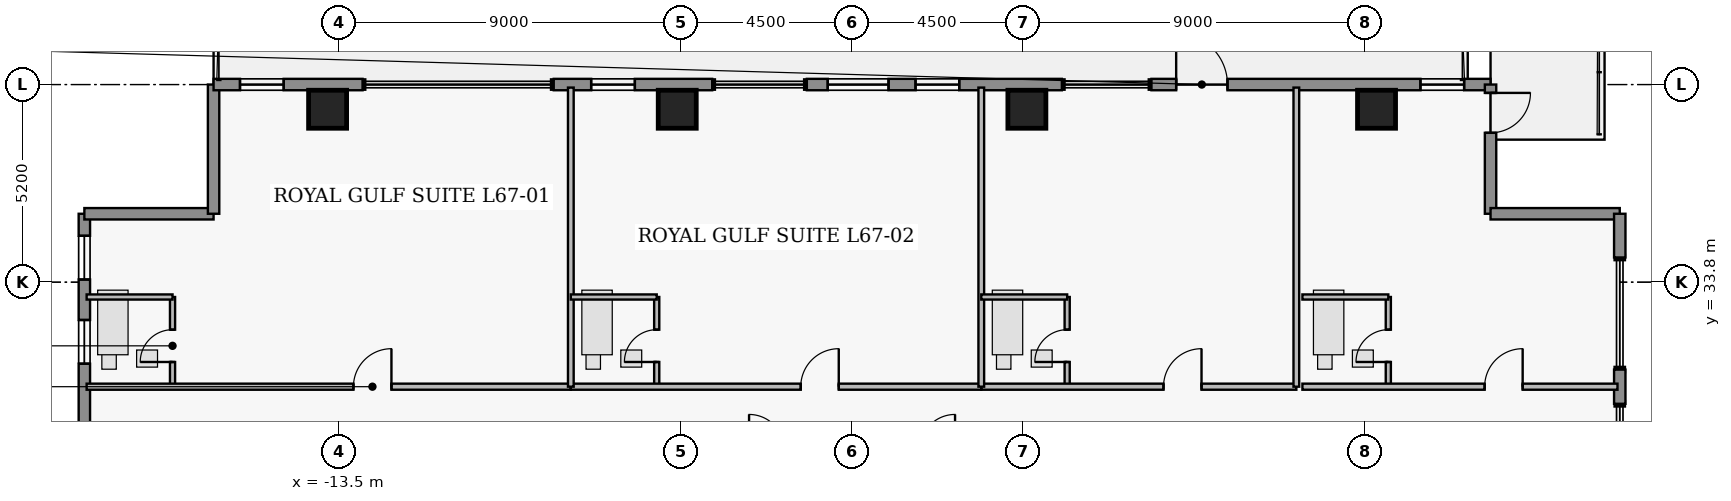
"""IFC4 building model, lengths in metres.
Left out: names, types, materials, properties, quantities, classifications, styles, units other than length and angle.
Written with IfcOpenShell. Run it as: python <this file> out.ifc"""

import sys

from ifc_helpers import new_model, si_unit, direction, frame, frame_2d, origin, origin_2d, place, context, subcontext, project, spatial, rectangle, extrude, element, fill, save


model = new_model("IFC4")
c1 = context("Model", 3, precision=1e-05, world=origin(), true_north=direction((0.0, 1.0)))
c2 = subcontext(c1, "Body", "Model", "MODEL_VIEW")
j1 = project(units=[si_unit("LENGTHUNIT", "METRE"), si_unit("PLANEANGLEUNIT", "RADIAN")], contexts=[c1])
p1 = place(None, origin())
s1 = spatial("IfcSite", under=j1, at=p1, CompositionType="ELEMENT")
p2 = place(p1, origin())
s2 = spatial("IfcBuilding", under=s1, at=p2, CompositionType="ELEMENT")
p3 = place(p2, frame((0.0, 0.0, 265.55)))
s3 = spatial("IfcBuildingStorey", under=s2, at=p3, CompositionType="ELEMENT", Elevation=265.55)
for number, where, z_axis, x_axis in (
    (1, (-13.8, 38.35, 0.0), (0.0, 0.0, 1.0), (1.0, 0.0, 0.0)),
    (2, (-4.6, 38.35, 0.0), (0.0, 0.0, 1.0), (1.0, 0.0, 0.0)),
    (3, (4.6, 38.35, 0.0), (0.0, 0.0, 1.0), (1.0, 0.0, 0.0)),
    (4, (13.8, 38.35, 0.0), (0.0, 0.0, 1.0), (1.0, 0.0, 0.0)),
):
    element("IfcColumn", number, at=place(p3, frame(where, z_axis=z_axis, x_axis=x_axis)), inside=s3, PredefinedType="COLUMN", context=c2, shape_type="SweptSolid", body=[
        extrude(rectangle(XDim=1.0, YDim=1.0, at=origin_2d()), origin(), (0.0, 0.0, 1.0), 3.7),
    ])
p4 = place(p3, frame((-20.2, 28.93, 0.0), z_axis=(0.0, 0.0, 1.0), x_axis=(0.0, 1.0, 0.0)))
e5 = element("IfcWall", 5, at=p4, inside=s3, PredefinedType="STANDARD", context=c2, shape_type="SweptSolid", body=[
    extrude(rectangle(XDim=6.67, YDim=0.3, at=frame_2d((3.335, 0.0))), origin(), (0.0, 0.0, 1.0), 3.48),
])
p5 = place(p4, frame((2.725, 0.0, 0.95)))
e6 = element("IfcOpeningElement", 6, at=p5, cuts=e5, PredefinedType="OPENING", context=c2, shape_type="SweptSolid", body=[
    extrude(rectangle(XDim=1.15, YDim=1.55, at=frame_2d((0.575, 0.775))), frame((0.0, 0.16, 0.0), z_axis=(0.0, -1.0, 0.0), x_axis=(1.0, 0.0, 0.0)), (0.0, 0.0, 1.0), 0.32),
])
p6 = place(p4, frame((4.94, 0.0, 0.95)))
e7 = element("IfcOpeningElement", 7, at=p6, cuts=e5, PredefinedType="OPENING", context=c2, shape_type="SweptSolid", body=[
    extrude(rectangle(XDim=1.15, YDim=1.55, at=frame_2d((0.575, 0.775))), frame((0.0, 0.16, 0.0), z_axis=(0.0, -1.0, 0.0), x_axis=(1.0, 0.0, 0.0)), (0.0, 0.0, 1.0), 0.32),
])
for number, where, z_axis, x_axis in (
    (8, (-20.2, 35.6, 0.0), (0.0, 0.0, 1.0), (1.0, 0.0, 0.0)),
    (9, (-16.8, 35.6, 0.0), (0.0, 0.0, 1.0), (0.0, 1.0, 0.0)),
):
    element("IfcWall", number, at=place(p3, frame(where, z_axis=z_axis, x_axis=x_axis)), inside=s3, PredefinedType="STANDARD", context=c2, shape_type="SweptSolid", body=[
        extrude(rectangle(XDim=3.4, YDim=0.3, at=frame_2d((1.7, 0.0))), origin(), (0.0, 0.0, 1.0), 3.48),
    ])
p7 = place(p3, frame((-16.8, 39.0, 0.0), z_axis=(0.0, 0.0, 1.0), x_axis=(1.0, 0.0, 0.0)))
e10 = element("IfcWall", 10, at=p7, inside=s3, PredefinedType="STANDARD", context=c2, shape_type="SweptSolid", body=[
    extrude(rectangle(XDim=3.92, YDim=0.3, at=frame_2d((1.96, 0.0))), origin(), (0.0, 0.0, 1.0), 3.48),
])
p8 = place(p7, frame((0.695, 0.0, 0.95)))
e11 = element("IfcOpeningElement", 11, at=p8, cuts=e10, PredefinedType="OPENING", context=c2, shape_type="SweptSolid", body=[
    extrude(rectangle(XDim=1.15, YDim=1.55, at=frame_2d((0.575, 0.775))), frame((0.0, 0.16, 0.0), z_axis=(0.0, -1.0, 0.0), x_axis=(1.0, 0.0, 0.0)), (0.0, 0.0, 1.0), 0.32),
])
p9 = place(p3, frame((-7.85, 39.0, 0.0), z_axis=(0.0, 0.0, 1.0), x_axis=(1.0, 0.0, 0.0)))
e12 = element("IfcWall", 12, at=p9, inside=s3, PredefinedType="STANDARD", context=c2, shape_type="SweptSolid", body=[
    extrude(rectangle(XDim=4.17, YDim=0.3, at=frame_2d((2.085, 0.0))), origin(), (0.0, 0.0, 1.0), 3.48),
])
p10 = place(p9, frame((0.985, 0.0, 0.95)))
e13 = element("IfcOpeningElement", 13, at=p10, cuts=e12, PredefinedType="OPENING", context=c2, shape_type="SweptSolid", body=[
    extrude(rectangle(XDim=1.15, YDim=1.55, at=frame_2d((0.575, 0.775))), frame((0.0, 0.16, 0.0), z_axis=(0.0, -1.0, 0.0), x_axis=(1.0, 0.0, 0.0)), (0.0, 0.0, 1.0), 0.32),
])
p11 = place(p3, frame((-1.19, 39.0, 0.0), z_axis=(0.0, 0.0, 1.0), x_axis=(1.0, 0.0, 0.0)))
e14 = element("IfcWall", 14, at=p11, inside=s3, PredefinedType="STANDARD", context=c2, shape_type="SweptSolid", body=[
    extrude(rectangle(XDim=6.71, YDim=0.3, at=frame_2d((3.355, 0.0))), origin(), (0.0, 0.0, 1.0), 3.48),
])
p12 = place(p11, frame((0.55, 0.0, 0.85)))
e15 = element("IfcOpeningElement", 15, at=p12, cuts=e14, PredefinedType="OPENING", context=c2, shape_type="SweptSolid", body=[
    extrude(rectangle(XDim=1.6, YDim=1.8, at=frame_2d((0.8, 0.9))), frame((0.0, 0.16, 0.0), z_axis=(0.0, -1.0, 0.0), x_axis=(1.0, 0.0, 0.0)), (0.0, 0.0, 1.0), 0.32),
])
p13 = place(p11, frame((2.86, 0.0, 0.95)))
e16 = element("IfcOpeningElement", 16, at=p13, cuts=e14, PredefinedType="OPENING", context=c2, shape_type="SweptSolid", body=[
    extrude(rectangle(XDim=1.15, YDim=1.55, at=frame_2d((0.575, 0.775))), frame((0.0, 0.16, 0.0), z_axis=(0.0, -1.0, 0.0), x_axis=(1.0, 0.0, 0.0)), (0.0, 0.0, 1.0), 0.32),
])
p14 = place(p3, frame((7.878, 39.0, 0.0), z_axis=(0.0, 0.0, 1.0), x_axis=(1.0, 0.0, 0.0)))
e17 = element("IfcWall", 17, at=p14, inside=s3, PredefinedType="STANDARD", context=c2, shape_type="SweptSolid", body=[
    extrude(rectangle(XDim=8.922, YDim=0.3, at=frame_2d((4.461, 0.0))), origin(), (0.0, 0.0, 1.0), 3.48),
])
p15 = place(p14, frame((0.65, 0.0, 0.0)))
e18 = element("IfcOpeningElement", 18, at=p15, cuts=e17, PredefinedType="OPENING", context=c2, shape_type="SweptSolid", body=[
    extrude(rectangle(XDim=1.35, YDim=2.3, at=frame_2d((0.675, 1.15))), frame((0.0, 0.16, 0.0), z_axis=(0.0, -1.0, 0.0), x_axis=(1.0, 0.0, 0.0)), (0.0, 0.0, 1.0), 0.32),
])
p16 = place(p14, frame((7.077, 0.0, 0.95)))
e19 = element("IfcOpeningElement", 19, at=p16, cuts=e17, PredefinedType="OPENING", context=c2, shape_type="SweptSolid", body=[
    extrude(rectangle(XDim=1.15, YDim=1.55, at=frame_2d((0.575, 0.775))), frame((0.0, 0.16, 0.0), z_axis=(0.0, -1.0, 0.0), x_axis=(1.0, 0.0, 0.0)), (0.0, 0.0, 1.0), 0.32),
])
p17 = place(p3, frame((16.8, 39.0, 0.0), z_axis=(0.0, 0.0, 1.0), x_axis=(0.0, -1.0, 0.0)))
e20 = element("IfcWall", 20, at=p17, inside=s3, PredefinedType="STANDARD", context=c2, shape_type="SweptSolid", body=[
    extrude(rectangle(XDim=3.4, YDim=0.3, at=frame_2d((1.7, 0.0))), origin(), (0.0, 0.0, 1.0), 3.48),
])
p18 = place(p17, frame((0.22, 0.0, 0.0)))
e21 = element("IfcOpeningElement", 21, at=p18, cuts=e20, PredefinedType="OPENING", context=c2, shape_type="SweptSolid", body=[
    extrude(rectangle(XDim=1.05, YDim=2.2, at=frame_2d((0.525, 1.1))), frame((0.0, 0.16, 0.0), z_axis=(0.0, -1.0, 0.0), x_axis=(1.0, 0.0, 0.0)), (0.0, 0.0, 1.0), 0.32),
])
p19 = place(p3, frame((16.8, 35.6, 0.0), z_axis=(0.0, 0.0, 1.0), x_axis=(1.0, 0.0, 0.0)))
e22 = element("IfcWall", 22, at=p19, inside=s3, PredefinedType="STANDARD", context=c2, shape_type="SweptSolid", body=[
    extrude(rectangle(XDim=3.4, YDim=0.3, at=frame_2d((1.7, 0.0))), origin(), (0.0, 0.0, 1.0), 3.48),
])
p20 = place(p3, frame((20.2, 35.6, 0.0), z_axis=(0.0, 0.0, 1.0), x_axis=(0.0, -1.0, 0.0)))
e23 = element("IfcWall", 23, at=p20, inside=s3, PredefinedType="STANDARD", context=c2, shape_type="SweptSolid", body=[
    extrude(rectangle(XDim=1.15, YDim=0.3, at=frame_2d((0.575, 0.0))), origin(), (0.0, 0.0, 1.0), 3.48),
])
p21 = place(p3, frame((20.2, 31.5, 0.0), z_axis=(0.0, 0.0, 1.0), x_axis=(0.0, -1.0, 0.0)))
e24 = element("IfcWall", 24, at=p21, inside=s3, PredefinedType="STANDARD", context=c2, shape_type="SweptSolid", body=[
    extrude(rectangle(XDim=0.9, YDim=0.3, at=frame_2d((0.45, 0.0))), origin(), (0.0, 0.0, 1.0), 3.48),
])
p22 = place(p3, frame((-17.88, 31.05, 0.0), z_axis=(0.0, 0.0, 1.0), x_axis=(0.0, 1.0, 0.0)))
e25 = element("IfcWall", 25, at=p22, inside=s3, PredefinedType="PLUMBINGWALL", context=c2, shape_type="SweptSolid", body=[
    extrude(rectangle(XDim=2.36, YDim=0.135, at=frame_2d((1.18, 0.0))), origin(), (0.0, 0.0, 1.0), 3.48),
])
p23 = place(p22, frame((0.65, 0.0, 0.0)))
e26 = element("IfcOpeningElement", 26, at=p23, cuts=e25, PredefinedType="OPENING", context=c2, shape_type="SweptSolid", body=[
    extrude(rectangle(XDim=0.85, YDim=2.1, at=frame_2d((0.425, 1.05))), frame((0.0, 0.077, 0.0), z_axis=(0.0, -1.0, 0.0), x_axis=(1.0, 0.0, 0.0)), (0.0, 0.0, 1.0), 0.155),
])
p24 = place(p3, frame((-20.14, 31.05, 0.0), z_axis=(0.0, 0.0, 1.0), x_axis=(1.0, 0.0, 0.0)))
e27 = element("IfcWall", 27, at=p24, inside=s3, PredefinedType="PARTITIONING", context=c2, shape_type="SweptSolid", body=[
    extrude(rectangle(XDim=12.74, YDim=0.16, at=frame_2d((6.37, 0.0))), origin(), (0.0, 0.0, 1.0), 3.48),
])
p25 = place(p24, frame((7.02, 0.0, 0.0)))
e28 = element("IfcOpeningElement", 28, at=p25, cuts=e27, PredefinedType="OPENING", context=c2, shape_type="SweptSolid", body=[
    extrude(rectangle(XDim=1.0, YDim=2.15, at=frame_2d((0.5, 1.075))), frame((0.0, 0.09, 0.0), z_axis=(0.0, -1.0, 0.0), x_axis=(1.0, 0.0, 0.0)), (0.0, 0.0, 1.0), 0.18),
])
p26 = place(p3, frame((-5.14, 31.05, 0.0), z_axis=(0.0, 0.0, 1.0), x_axis=(0.0, 1.0, 0.0)))
e29 = element("IfcWall", 29, at=p26, inside=s3, PredefinedType="PLUMBINGWALL", context=c2, shape_type="SweptSolid", body=[
    extrude(rectangle(XDim=2.36, YDim=0.135, at=frame_2d((1.18, 0.0))), origin(), (0.0, 0.0, 1.0), 3.48),
])
p27 = place(p26, frame((0.65, 0.0, 0.0)))
e30 = element("IfcOpeningElement", 30, at=p27, cuts=e29, PredefinedType="OPENING", context=c2, shape_type="SweptSolid", body=[
    extrude(rectangle(XDim=0.85, YDim=2.1, at=frame_2d((0.425, 1.05))), frame((0.0, 0.077, 0.0), z_axis=(0.0, -1.0, 0.0), x_axis=(1.0, 0.0, 0.0)), (0.0, 0.0, 1.0), 0.155),
])
p28 = place(p3, frame((-7.4, 31.05, 0.0), z_axis=(0.0, 0.0, 1.0), x_axis=(1.0, 0.0, 0.0)))
e31 = element("IfcWall", 31, at=p28, inside=s3, PredefinedType="PARTITIONING", context=c2, shape_type="SweptSolid", body=[
    extrude(rectangle(XDim=10.8, YDim=0.16, at=frame_2d((5.4, 0.0))), origin(), (0.0, 0.0, 1.0), 3.48),
])
p29 = place(p28, frame((6.05, 0.0, 0.0)))
e32 = element("IfcOpeningElement", 32, at=p29, cuts=e31, PredefinedType="OPENING", context=c2, shape_type="SweptSolid", body=[
    extrude(rectangle(XDim=1.0, YDim=2.15, at=frame_2d((0.5, 1.075))), frame((0.0, 0.09, 0.0), z_axis=(0.0, -1.0, 0.0), x_axis=(1.0, 0.0, 0.0)), (0.0, 0.0, 1.0), 0.18),
])
p30 = place(p3, frame((5.66, 31.05, 0.0), z_axis=(0.0, 0.0, 1.0), x_axis=(0.0, 1.0, 0.0)))
e33 = element("IfcWall", 33, at=p30, inside=s3, PredefinedType="PLUMBINGWALL", context=c2, shape_type="SweptSolid", body=[
    extrude(rectangle(XDim=2.36, YDim=0.135, at=frame_2d((1.18, 0.0))), origin(), (0.0, 0.0, 1.0), 3.48),
])
p31 = place(p30, frame((0.65, 0.0, 0.0)))
e34 = element("IfcOpeningElement", 34, at=p31, cuts=e33, PredefinedType="OPENING", context=c2, shape_type="SweptSolid", body=[
    extrude(rectangle(XDim=0.85, YDim=2.1, at=frame_2d((0.425, 1.05))), frame((0.0, 0.077, 0.0), z_axis=(0.0, -1.0, 0.0), x_axis=(1.0, 0.0, 0.0)), (0.0, 0.0, 1.0), 0.155),
])
p32 = place(p3, frame((3.4, 31.05, 0.0), z_axis=(0.0, 0.0, 1.0), x_axis=(1.0, 0.0, 0.0)))
e35 = element("IfcWall", 35, at=p32, inside=s3, PredefinedType="PARTITIONING", context=c2, shape_type="SweptSolid", body=[
    extrude(rectangle(XDim=8.29, YDim=0.16, at=frame_2d((4.145, 0.0))), origin(), (0.0, 0.0, 1.0), 3.48),
])
p33 = place(p32, frame((4.795, 0.0, 0.0)))
e36 = element("IfcOpeningElement", 36, at=p33, cuts=e35, PredefinedType="OPENING", context=c2, shape_type="SweptSolid", body=[
    extrude(rectangle(XDim=1.0, YDim=2.15, at=frame_2d((0.5, 1.075))), frame((0.0, 0.09, 0.0), z_axis=(0.0, -1.0, 0.0), x_axis=(1.0, 0.0, 0.0)), (0.0, 0.0, 1.0), 0.18),
])
p34 = place(p3, frame((14.11, 31.05, 0.0), z_axis=(0.0, 0.0, 1.0), x_axis=(0.0, 1.0, 0.0)))
e37 = element("IfcWall", 37, at=p34, inside=s3, PredefinedType="PLUMBINGWALL", context=c2, shape_type="SweptSolid", body=[
    extrude(rectangle(XDim=2.36, YDim=0.135, at=frame_2d((1.18, 0.0))), origin(), (0.0, 0.0, 1.0), 2.362),
])
p35 = place(p34, frame((0.65, 0.0, 0.0)))
e38 = element("IfcOpeningElement", 38, at=p35, cuts=e37, PredefinedType="OPENING", context=c2, shape_type="SweptSolid", body=[
    extrude(rectangle(XDim=0.85, YDim=2.1, at=frame_2d((0.425, 1.05))), frame((0.0, 0.077, 0.0), z_axis=(0.0, -1.0, 0.0), x_axis=(1.0, 0.0, 0.0)), (0.0, 0.0, 1.0), 0.155),
])
p36 = place(p3, frame((11.85, 31.05, 0.0), z_axis=(0.0, 0.0, 1.0), x_axis=(1.0, 0.0, 0.0)))
e39 = element("IfcWall", 39, at=p36, inside=s3, PredefinedType="PARTITIONING", context=c2, shape_type="SweptSolid", body=[
    extrude(rectangle(XDim=8.29, YDim=0.16, at=frame_2d((4.145, 0.0))), origin(), (0.0, 0.0, 1.0), 3.48),
])
p37 = place(p36, frame((4.795, 0.0, 0.0)))
e40 = element("IfcOpeningElement", 40, at=p37, cuts=e39, PredefinedType="OPENING", context=c2, shape_type="SweptSolid", body=[
    extrude(rectangle(XDim=1.0, YDim=2.15, at=frame_2d((0.5, 1.075))), frame((0.0, 0.09, 0.0), z_axis=(0.0, -1.0, 0.0), x_axis=(1.0, 0.0, 0.0)), (0.0, 0.0, 1.0), 0.18),
])
p38 = place(p3, frame((-20.14, 33.41, 0.0), z_axis=(0.0, 0.0, 1.0), x_axis=(1.0, 0.0, 0.0)))
e41 = element("IfcWall", 41, at=p38, inside=s3, PredefinedType="PLUMBINGWALL", context=c2, shape_type="SweptSolid", body=[
    extrude(rectangle(XDim=2.26, YDim=0.135, at=frame_2d((1.13, 0.0))), origin(), (0.0, 0.0, 1.0), 3.48),
])
p39 = place(p3, frame((-7.4, 31.05, 0.0), z_axis=(0.0, 0.0, 1.0), x_axis=(0.0, 1.0, 0.0)))
e42 = element("IfcWall", 42, at=p39, inside=s3, PredefinedType="PARTITIONING", context=c2, shape_type="SweptSolid", body=[
    extrude(rectangle(XDim=7.87, YDim=0.15, at=frame_2d((3.935, 0.0))), origin(), (0.0, 0.0, 1.0), 3.48),
])
p40 = place(p3, frame((-7.4, 33.41, 0.0), z_axis=(0.0, 0.0, 1.0), x_axis=(1.0, 0.0, 0.0)))
e43 = element("IfcWall", 43, at=p40, inside=s3, PredefinedType="PLUMBINGWALL", context=c2, shape_type="SweptSolid", body=[
    extrude(rectangle(XDim=2.26, YDim=0.135, at=frame_2d((1.13, 0.0))), origin(), (0.0, 0.0, 1.0), 3.076),
])
p41 = place(p3, frame((3.4, 31.05, 0.0), z_axis=(0.0, 0.0, 1.0), x_axis=(0.0, 1.0, 0.0)))
e44 = element("IfcWall", 44, at=p41, inside=s3, PredefinedType="PARTITIONING", context=c2, shape_type="SweptSolid", body=[
    extrude(rectangle(XDim=7.87, YDim=0.15, at=frame_2d((3.935, 0.0))), origin(), (0.0, 0.0, 1.0), 3.48),
])
p42 = place(p3, frame((3.4, 33.41, 0.0), z_axis=(0.0, 0.0, 1.0), x_axis=(1.0, 0.0, 0.0)))
e45 = element("IfcWall", 45, at=p42, inside=s3, PredefinedType="PLUMBINGWALL", context=c2, shape_type="SweptSolid", body=[
    extrude(rectangle(XDim=2.26, YDim=0.135, at=frame_2d((1.13, 0.0))), origin(), (0.0, 0.0, 1.0), 3.076),
])
p43 = place(p3, frame((11.69, 31.05, 0.0), z_axis=(0.0, 0.0, 1.0), x_axis=(0.0, 1.0, 0.0)))
e46 = element("IfcWall", 46, at=p43, inside=s3, PredefinedType="PARTITIONING", context=c2, shape_type="SweptSolid", body=[
    extrude(rectangle(XDim=7.87, YDim=0.15, at=frame_2d((3.935, 0.0))), origin(), (0.0, 0.0, 1.0), 3.48),
])
p44 = place(p3, frame((11.85, 33.41, 0.0), z_axis=(0.0, 0.0, 1.0), x_axis=(1.0, 0.0, 0.0)))
e47 = element("IfcWall", 47, at=p44, inside=s3, PredefinedType="PLUMBINGWALL", context=c2, shape_type="SweptSolid", body=[
    extrude(rectangle(XDim=2.26, YDim=0.135, at=frame_2d((1.13, 0.0))), origin(), (0.0, 0.0, 1.0), 3.076),
])
p45 = place(p5, origin())
e48 = element("IfcWindow", 48, at=p45, inside=s3, PartitioningType="SINGLE_PANEL", PredefinedType="WINDOW", context=c2, shape_type="SweptSolid", body=[
    extrude(rectangle(XDim=1.15, YDim=1.55, at=frame_2d((0.575, 0.775))), frame((0.0, 0.03, 0.0), z_axis=(0.0, -1.0, 0.0), x_axis=(1.0, 0.0, 0.0)), (0.0, 0.0, 1.0), 0.06),
])
fill(e6, e48)
p46 = place(p6, origin())
e49 = element("IfcWindow", 49, at=p46, inside=s3, PartitioningType="SINGLE_PANEL", PredefinedType="WINDOW", context=c2, shape_type="SweptSolid", body=[
    extrude(rectangle(XDim=1.15, YDim=1.55, at=frame_2d((0.575, 0.775))), frame((0.0, 0.03, 0.0), z_axis=(0.0, -1.0, 0.0), x_axis=(1.0, 0.0, 0.0)), (0.0, 0.0, 1.0), 0.06),
])
fill(e7, e49)
p47 = place(p8, origin())
e50 = element("IfcWindow", 50, at=p47, inside=s3, PartitioningType="SINGLE_PANEL", PredefinedType="WINDOW", context=c2, shape_type="SweptSolid", body=[
    extrude(rectangle(XDim=1.15, YDim=1.55, at=frame_2d((0.575, 0.775))), frame((0.0, 0.03, 0.0), z_axis=(0.0, -1.0, 0.0), x_axis=(1.0, 0.0, 0.0)), (0.0, 0.0, 1.0), 0.06),
])
fill(e11, e50)
p48 = place(p10, origin())
e51 = element("IfcWindow", 51, at=p48, inside=s3, PartitioningType="SINGLE_PANEL", PredefinedType="WINDOW", context=c2, shape_type="SweptSolid", body=[
    extrude(rectangle(XDim=1.15, YDim=1.55, at=frame_2d((0.575, 0.775))), frame((0.0, 0.03, 0.0), z_axis=(0.0, -1.0, 0.0), x_axis=(1.0, 0.0, 0.0)), (0.0, 0.0, 1.0), 0.06),
])
fill(e13, e51)
p49 = place(p12, origin())
e52 = element("IfcWindow", 52, at=p49, inside=s3, PartitioningType="SINGLE_PANEL", PredefinedType="WINDOW", context=c2, shape_type="SweptSolid", body=[
    extrude(rectangle(XDim=1.6, YDim=1.8, at=frame_2d((0.8, 0.9))), frame((0.0, 0.03, 0.0), z_axis=(0.0, -1.0, 0.0), x_axis=(1.0, 0.0, 0.0)), (0.0, 0.0, 1.0), 0.06),
])
fill(e15, e52)
p50 = place(p13, origin())
e53 = element("IfcWindow", 53, at=p50, inside=s3, PartitioningType="SINGLE_PANEL", PredefinedType="WINDOW", context=c2, shape_type="SweptSolid", body=[
    extrude(rectangle(XDim=1.15, YDim=1.55, at=frame_2d((0.575, 0.775))), frame((0.0, 0.03, 0.0), z_axis=(0.0, -1.0, 0.0), x_axis=(1.0, 0.0, 0.0)), (0.0, 0.0, 1.0), 0.06),
])
fill(e16, e53)
p51 = place(p15, origin())
e54 = element("IfcDoor", 54, at=p51, inside=s3, OperationType="SINGLE_SWING_LEFT", PredefinedType="DOOR", context=c2, shape_type="SweptSolid", body=[
    extrude(rectangle(XDim=1.35, YDim=2.3, at=frame_2d((0.675, 1.15))), frame((0.0, 0.025, 0.0), z_axis=(0.0, -1.0, 0.0), x_axis=(1.0, 0.0, 0.0)), (0.0, 0.0, 1.0), 0.05),
])
fill(e18, e54)
p52 = place(p16, origin())
e55 = element("IfcWindow", 55, at=p52, inside=s3, PartitioningType="SINGLE_PANEL", PredefinedType="WINDOW", context=c2, shape_type="SweptSolid", body=[
    extrude(rectangle(XDim=1.15, YDim=1.55, at=frame_2d((0.575, 0.775))), frame((0.0, 0.03, 0.0), z_axis=(0.0, -1.0, 0.0), x_axis=(1.0, 0.0, 0.0)), (0.0, 0.0, 1.0), 0.06),
])
fill(e19, e55)
p53 = place(p18, origin())
e56 = element("IfcDoor", 56, at=p53, inside=s3, OperationType="SINGLE_SWING_LEFT", PredefinedType="DOOR", context=c2, shape_type="SweptSolid", body=[
    extrude(rectangle(XDim=1.05, YDim=2.2, at=frame_2d((0.525, 1.1))), frame((0.0, 0.025, 0.0), z_axis=(0.0, -1.0, 0.0), x_axis=(1.0, 0.0, 0.0)), (0.0, 0.0, 1.0), 0.05),
])
fill(e21, e56)
p54 = place(p23, origin())
e57 = element("IfcDoor", 57, at=p54, inside=s3, OperationType="SINGLE_SWING_LEFT", PredefinedType="DOOR", context=c2, shape_type="SweptSolid", body=[
    extrude(rectangle(XDim=0.85, YDim=2.1, at=frame_2d((0.425, 1.05))), frame((0.0, 0.025, 0.0), z_axis=(0.0, -1.0, 0.0), x_axis=(1.0, 0.0, 0.0)), (0.0, 0.0, 1.0), 0.05),
])
fill(e26, e57)
p55 = place(p25, origin())
e58 = element("IfcDoor", 58, at=p55, inside=s3, OperationType="SINGLE_SWING_RIGHT", PredefinedType="DOOR", context=c2, shape_type="SweptSolid", body=[
    extrude(rectangle(XDim=1.0, YDim=2.15, at=frame_2d((0.5, 1.075))), frame((0.0, 0.025, 0.0), z_axis=(0.0, -1.0, 0.0), x_axis=(1.0, 0.0, 0.0)), (0.0, 0.0, 1.0), 0.05),
])
fill(e28, e58)
p56 = place(p27, origin())
e59 = element("IfcDoor", 59, at=p56, inside=s3, OperationType="SINGLE_SWING_LEFT", PredefinedType="DOOR", context=c2, shape_type="SweptSolid", body=[
    extrude(rectangle(XDim=0.85, YDim=2.1, at=frame_2d((0.425, 1.05))), frame((0.0, 0.025, 0.0), z_axis=(0.0, -1.0, 0.0), x_axis=(1.0, 0.0, 0.0)), (0.0, 0.0, 1.0), 0.05),
])
fill(e30, e59)
p57 = place(p29, origin())
e60 = element("IfcDoor", 60, at=p57, inside=s3, OperationType="SINGLE_SWING_RIGHT", PredefinedType="DOOR", context=c2, shape_type="SweptSolid", body=[
    extrude(rectangle(XDim=1.0, YDim=2.15, at=frame_2d((0.5, 1.075))), frame((0.0, 0.025, 0.0), z_axis=(0.0, -1.0, 0.0), x_axis=(1.0, 0.0, 0.0)), (0.0, 0.0, 1.0), 0.05),
])
fill(e32, e60)
p58 = place(p31, origin())
e61 = element("IfcDoor", 61, at=p58, inside=s3, OperationType="SINGLE_SWING_LEFT", PredefinedType="DOOR", context=c2, shape_type="SweptSolid", body=[
    extrude(rectangle(XDim=0.85, YDim=2.1, at=frame_2d((0.425, 1.05))), frame((0.0, 0.025, 0.0), z_axis=(0.0, -1.0, 0.0), x_axis=(1.0, 0.0, 0.0)), (0.0, 0.0, 1.0), 0.05),
])
fill(e34, e61)
p59 = place(p33, origin())
e62 = element("IfcDoor", 62, at=p59, inside=s3, OperationType="SINGLE_SWING_RIGHT", PredefinedType="DOOR", context=c2, shape_type="SweptSolid", body=[
    extrude(rectangle(XDim=1.0, YDim=2.15, at=frame_2d((0.5, 1.075))), frame((0.0, 0.025, 0.0), z_axis=(0.0, -1.0, 0.0), x_axis=(1.0, 0.0, 0.0)), (0.0, 0.0, 1.0), 0.05),
])
fill(e36, e62)
p60 = place(p35, origin())
e63 = element("IfcDoor", 63, at=p60, inside=s3, OperationType="SINGLE_SWING_LEFT", PredefinedType="DOOR", context=c2, shape_type="SweptSolid", body=[
    extrude(rectangle(XDim=0.85, YDim=2.1, at=frame_2d((0.425, 1.05))), frame((0.0, 0.025, 0.0), z_axis=(0.0, -1.0, 0.0), x_axis=(1.0, 0.0, 0.0)), (0.0, 0.0, 1.0), 0.05),
])
fill(e38, e63)
p61 = place(p37, origin())
e64 = element("IfcDoor", 64, at=p61, inside=s3, OperationType="SINGLE_SWING_RIGHT", PredefinedType="DOOR", context=c2, shape_type="SweptSolid", body=[
    extrude(rectangle(XDim=1.0, YDim=2.15, at=frame_2d((0.5, 1.075))), frame((0.0, 0.025, 0.0), z_axis=(0.0, -1.0, 0.0), x_axis=(1.0, 0.0, 0.0)), (0.0, 0.0, 1.0), 0.05),
])
fill(e40, e64)
save(model, sys.argv[1])
